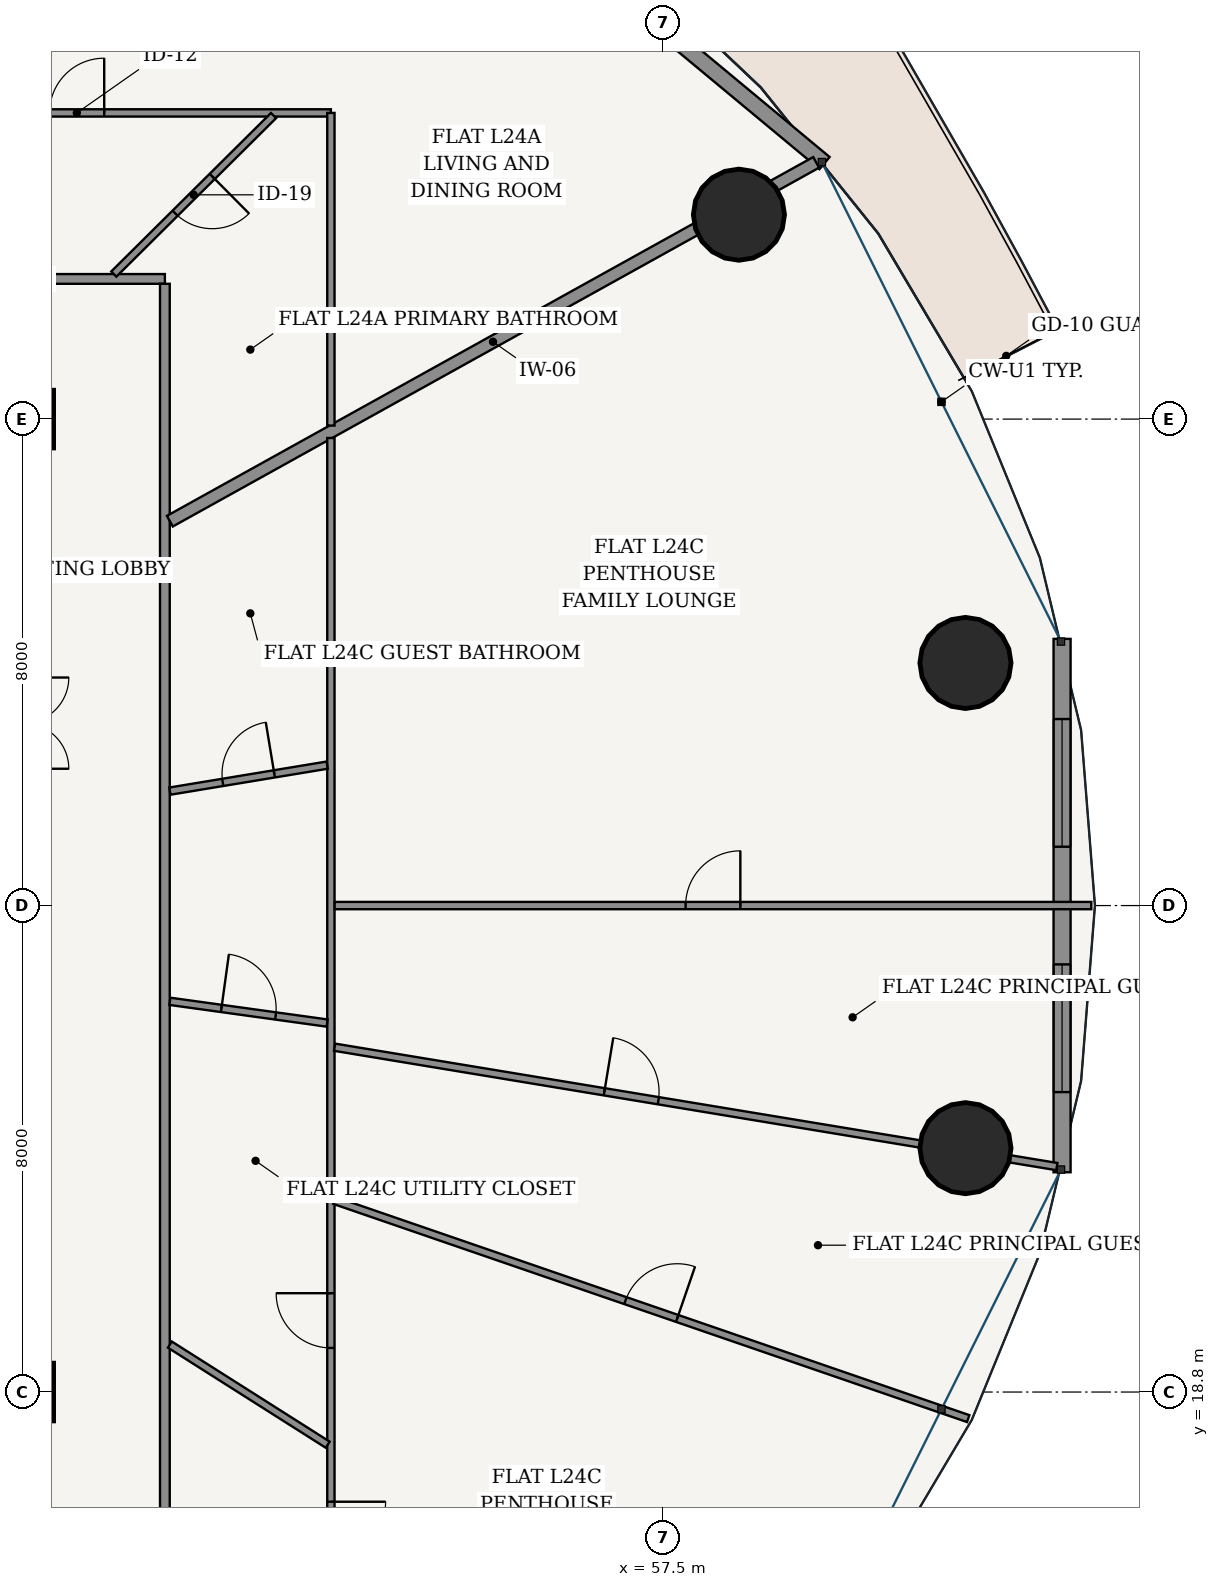
"""IFC4 building model, lengths in metres.
Left out: names, types, materials, properties, quantities, classifications, styles, units other than length and angle.
Written with IfcOpenShell. Run it as: python <this file> out.ifc"""

import sys

from ifc_helpers import new_model, si_unit, direction, frame, frame_2d, origin, origin_2d, place, context, subcontext, project, spatial, rectangle, hollow_circle, extrude, source, transform, mapped, element, fill, save


model = new_model("IFC4")
c1 = context("Model", 3, precision=1e-05, world=origin(), true_north=direction((-0.2419218956, 0.970295726276)))
c2 = subcontext(c1, "Body", "Model", "MODEL_VIEW")
j1 = project(units=[si_unit("LENGTHUNIT", "METRE"), si_unit("PLANEANGLEUNIT", "RADIAN")], contexts=[c1])
p1 = place(None, origin())
s1 = spatial("IfcSite", under=j1, at=p1, CompositionType="ELEMENT")
p2 = place(p1, origin())
s2 = spatial("IfcBuilding", under=s1, at=p2, CompositionType="ELEMENT")
p3 = place(p2, frame((0.0, 0.0, 94.2)))
s3 = spatial("IfcBuildingStorey", under=s2, at=p3, CompositionType="ELEMENT", Elevation=94.2)
for number, where, z_axis, x_axis in (
    (1, (47.0, 18.8, 0.0), (0.0, 0.0, 1.0), (1.0, 0.0, 0.0)),
    (2, (47.0, 34.8, 0.0), (0.0, 0.0, 1.0), (1.0, 0.0, 0.0)),
):
    element("IfcColumn", number, at=place(p3, frame(where, z_axis=z_axis, x_axis=x_axis)), inside=s3, PredefinedType="COLUMN", context=c2, shape_type="SweptSolid", body=[
        extrude(rectangle(XDim=0.95, YDim=0.95, at=origin_2d()), origin(), (0.0, 0.0, 1.0), 3.6),
    ])
for number, where, z_axis, x_axis in (
    (3, (62.471, 30.79, 0.0), (0.0, 0.0, 1.0), (1.0, 0.0, 0.0)),
    (4, (58.745, 38.161, 0.0), (0.0, 0.0, 1.0), (1.0, 0.0, 0.0)),
    (5, (62.471, 22.81, 0.0), (0.0, 0.0, 1.0), (1.0, 0.0, 0.0)),
):
    element("IfcColumn", number, at=place(p3, frame(where, z_axis=z_axis, x_axis=x_axis)), inside=s3, PredefinedType="COLUMN", context=c2, shape_type="SweptSolid", body=[
        extrude(hollow_circle(Radius=0.75, WallThickness=0.045, at=origin_2d()), origin(), (0.0, 0.0, 1.0), 3.6),
    ])
p4 = place(p3, frame((60.154, 39.01, 0.0), z_axis=(0.0, 0.0, 1.0), x_axis=(-0.769242574941, 0.638956853706, 0.0)))
e6 = element("IfcWall", 6, at=p4, inside=s3, PredefinedType="SOLIDWALL", context=c2, shape_type="SweptSolid", body=[
    extrude(rectangle(XDim=9.69, YDim=0.26, at=frame_2d((4.845, 0.0))), origin(), (0.0, 0.0, 1.0), 3.325),
])
p5 = place(p4, frame((4.17, 0.0, 0.0)))
e7 = element("IfcOpeningElement", 7, at=p5, cuts=e6, PredefinedType="OPENING", context=c2, shape_type="SweptSolid", body=[
    extrude(rectangle(XDim=1.35, YDim=2.2, at=frame_2d((0.675, 1.1))), frame((0.0, 0.14, 0.0), z_axis=(0.0, -1.0, 0.0), x_axis=(1.0, 0.0, 0.0)), (0.0, 0.0, 1.0), 0.28),
])
p6 = place(p3, frame((64.06, 22.414, 0.0), z_axis=(0.0, 0.0, 1.0), x_axis=(0.0, 1.0, 0.0)))
e8 = element("IfcWall", 8, at=p6, inside=s3, PredefinedType="SOLIDWALL", context=c2, shape_type="SweptSolid", body=[
    extrude(rectangle(XDim=8.771, YDim=0.28, at=frame_2d((4.386, 0.0))), origin(), (0.0, 0.0, 1.0), 3.325),
])
p7 = place(p6, frame((1.318, 0.0, 0.85)))
e9 = element("IfcOpeningElement", 9, at=p7, cuts=e8, PredefinedType="OPENING", context=c2, shape_type="SweptSolid", body=[
    extrude(rectangle(XDim=2.1, YDim=1.95, at=frame_2d((1.05, 0.975))), frame((0.0, 0.15, 0.0), z_axis=(0.0, -1.0, 0.0), x_axis=(1.0, 0.0, 0.0)), (0.0, 0.0, 1.0), 0.3),
])
p8 = place(p6, frame((5.353, 0.0, 0.85)))
e10 = element("IfcOpeningElement", 10, at=p8, cuts=e8, PredefinedType="OPENING", context=c2, shape_type="SweptSolid", body=[
    extrude(rectangle(XDim=2.1, YDim=1.95, at=frame_2d((1.05, 0.975))), frame((0.0, 0.15, 0.0), z_axis=(0.0, -1.0, 0.0), x_axis=(1.0, 0.0, 0.0)), (0.0, 0.0, 1.0), 0.3),
])
p9 = place(p3, frame((26.695, 37.105, 0.0), z_axis=(0.0, 0.0, 1.0), x_axis=(1.0, 0.0, 0.0)))
e11 = element("IfcWall", 11, at=p9, inside=s3, PredefinedType="PARTITIONING", context=c2, shape_type="SweptSolid", body=[
    extrude(rectangle(XDim=22.61, YDim=0.16, at=frame_2d((11.305, 0.0))), origin(), (0.0, 0.0, 1.0), 2.767),
])
p10 = place(p9, frame((18.058, 0.0, 0.0)))
e12 = element("IfcOpeningElement", 12, at=p10, cuts=e11, PredefinedType="OPENING", context=c2, shape_type="SweptSolid", body=[
    extrude(rectangle(XDim=0.98, YDim=2.2, at=frame_2d((0.49, 1.1))), frame((0.0, 0.09, 0.0), z_axis=(0.0, -1.0, 0.0), x_axis=(1.0, 0.0, 0.0)), (0.0, 0.0, 1.0), 0.18),
])
p11 = place(p3, frame((49.305, 16.575, 0.0), z_axis=(0.0, 0.0, 1.0), x_axis=(0.0, 1.0, 0.0)))
e13 = element("IfcWall", 13, at=p11, inside=s3, PredefinedType="PARTITIONING", context=c2, shape_type="SweptSolid", body=[
    extrude(rectangle(XDim=20.45, YDim=0.16, at=frame_2d((10.225, 0.0))), origin(), (0.0, 0.0, 1.0), 2.767),
])
p12 = place(p3, frame((49.387, 33.121, 0.0), z_axis=(0.0, 0.0, 1.0), x_axis=(0.874320165728, 0.485349613992, 0.0)))
e14 = element("IfcWall", 14, at=p12, inside=s3, PredefinedType="PARTITIONING", context=c2, shape_type="SweptSolid", body=[
    extrude(rectangle(XDim=12.156, YDim=0.2, at=frame_2d((6.078, 0.0))), origin(), (0.0, 0.0, 1.0), 2.767),
])
p13 = place(p3, frame((23.965, 39.835, 0.0), z_axis=(0.0, 0.0, 1.0), x_axis=(1.0, 0.0, 0.0)))
e15 = element("IfcWall", 15, at=p13, inside=s3, PredefinedType="PARTITIONING", context=c2, shape_type="SweptSolid", body=[
    extrude(rectangle(XDim=28.07, YDim=0.12, at=frame_2d((14.035, 0.0))), origin(), (0.0, 0.0, 1.0), 2.767),
])
p14 = place(p13, frame((23.442, 0.0, 0.0)))
e16 = element("IfcOpeningElement", 16, at=p14, cuts=e15, PredefinedType="OPENING", context=c2, shape_type="SweptSolid", body=[
    extrude(rectangle(XDim=0.9, YDim=2.15, at=frame_2d((0.45, 1.075))), frame((0.0, 0.07, 0.0), z_axis=(0.0, -1.0, 0.0), x_axis=(1.0, 0.0, 0.0)), (0.0, 0.0, 1.0), 0.14),
])
p15 = place(p3, frame((52.035, 39.835, 0.0), z_axis=(0.0, 0.0, 1.0), x_axis=(0.0, -1.0, 0.0)))
e17 = element("IfcWall", 17, at=p15, inside=s3, PredefinedType="PARTITIONING", context=c2, shape_type="SweptSolid", body=[
    extrude(rectangle(XDim=5.142, YDim=0.12, at=frame_2d((2.571, 0.0))), origin(), (0.0, 0.0, 1.0), 3.004),
])
p16 = place(p3, frame((44.526, 39.89, 0.0), z_axis=(0.0, 0.0, 1.0), x_axis=(0.446167584581, 0.894949432353, 0.0)))
e18 = element("IfcWall", 18, at=p16, inside=s3, PredefinedType="PARTITIONING", context=c2, shape_type="SweptSolid", body=[
    extrude(rectangle(XDim=8.125, YDim=0.12, at=frame_2d((4.062, 0.0))), origin(), (0.0, 0.0, 1.0), 2.767),
])
p17 = place(p16, frame((3.612, 0.0, 0.0)))
e19 = element("IfcOpeningElement", 19, at=p17, cuts=e18, PredefinedType="OPENING", context=c2, shape_type="SweptSolid", body=[
    extrude(rectangle(XDim=0.9, YDim=2.15, at=frame_2d((0.45, 1.075))), frame((0.0, 0.07, 0.0), z_axis=(0.0, -1.0, 0.0), x_axis=(1.0, 0.0, 0.0)), (0.0, 0.0, 1.0), 0.14),
])
p18 = place(p3, frame((48.465, 37.185, 0.0), z_axis=(0.0, 0.0, 1.0), x_axis=(0.709839752998, 0.704363205359, 0.0)))
e20 = element("IfcWall", 20, at=p18, inside=s3, PredefinedType="PARTITIONING", context=c2, shape_type="SweptSolid", body=[
    extrude(rectangle(XDim=3.7, YDim=0.12, at=frame_2d((1.85, 0.0))), origin(), (0.0, 0.0, 1.0), 2.767),
])
p19 = place(p18, frame((1.42, 0.0, 0.0)))
e21 = element("IfcOpeningElement", 21, at=p19, cuts=e20, PredefinedType="OPENING", context=c2, shape_type="SweptSolid", body=[
    extrude(rectangle(XDim=0.86, YDim=2.15, at=frame_2d((0.43, 1.075))), frame((0.0, 0.07, 0.0), z_axis=(0.0, -1.0, 0.0), x_axis=(1.0, 0.0, 0.0)), (0.0, 0.0, 1.0), 0.14),
])
p20 = place(p3, frame((52.035, 34.49, 0.0), z_axis=(0.0, 0.0, 1.0), x_axis=(0.0, -1.0, 0.0)))
e22 = element("IfcWall", 22, at=p20, inside=s3, PredefinedType="PARTITIONING", context=c2, shape_type="SweptSolid", body=[
    extrude(rectangle(XDim=20.725, YDim=0.12, at=frame_2d((10.362, 0.0))), origin(), (0.0, 0.0, 1.0), 2.767),
])
p21 = place(p20, frame((17.493, 0.0, 0.0)))
e23 = element("IfcOpeningElement", 23, at=p21, cuts=e22, PredefinedType="OPENING", context=c2, shape_type="SweptSolid", body=[
    extrude(rectangle(XDim=0.9, YDim=2.15, at=frame_2d((0.45, 1.075))), frame((0.0, 0.07, 0.0), z_axis=(0.0, -1.0, 0.0), x_axis=(1.0, 0.0, 0.0)), (0.0, 0.0, 1.0), 0.14),
])
p22 = place(p20, frame((14.064, 0.0, 0.0)))
e24 = element("IfcOpeningElement", 24, at=p22, cuts=e22, PredefinedType="OPENING", context=c2, shape_type="SweptSolid", body=[
    extrude(rectangle(XDim=0.9, YDim=2.15, at=frame_2d((0.45, 1.075))), frame((0.0, 0.07, 0.0), z_axis=(0.0, -1.0, 0.0), x_axis=(1.0, 0.0, 0.0)), (0.0, 0.0, 1.0), 0.14),
])
p23 = place(p3, frame((52.094, 21.95, 0.0), z_axis=(0.0, 0.0, 1.0), x_axis=(0.945573120726, -0.32540970078, 0.0)))
e25 = element("IfcWall", 25, at=p23, inside=s3, PredefinedType="PARTITIONING", context=c2, shape_type="SweptSolid", body=[
    extrude(rectangle(XDim=11.022, YDim=0.12, at=frame_2d((5.511, 0.0))), origin(), (0.0, 0.0, 1.0), 2.767),
])
p24 = place(p23, frame((5.061, 0.0, 0.0)))
e26 = element("IfcOpeningElement", 26, at=p24, cuts=e25, PredefinedType="OPENING", context=c2, shape_type="SweptSolid", body=[
    extrude(rectangle(XDim=0.9, YDim=2.15, at=frame_2d((0.45, 1.075))), frame((0.0, 0.07, 0.0), z_axis=(0.0, -1.0, 0.0), x_axis=(1.0, 0.0, 0.0)), (0.0, 0.0, 1.0), 0.14),
])
p25 = place(p3, frame((52.096, 24.47, 0.0), z_axis=(0.0, 0.0, 1.0), x_axis=(0.986618264768, -0.163047231274, 0.0)))
e27 = element("IfcWall", 27, at=p25, inside=s3, PredefinedType="PARTITIONING", context=c2, shape_type="SweptSolid", body=[
    extrude(rectangle(XDim=12.039, YDim=0.12, at=frame_2d((6.02, 0.0))), origin(), (0.0, 0.0, 1.0), 2.767),
])
p26 = place(p25, frame((4.496, 0.0, 0.0)))
e28 = element("IfcOpeningElement", 28, at=p26, cuts=e27, PredefinedType="OPENING", context=c2, shape_type="SweptSolid", body=[
    extrude(rectangle(XDim=0.9, YDim=2.15, at=frame_2d((0.45, 1.075))), frame((0.0, 0.07, 0.0), z_axis=(0.0, -1.0, 0.0), x_axis=(1.0, 0.0, 0.0)), (0.0, 0.0, 1.0), 0.14),
])
p27 = place(p3, frame((52.097, 26.8, 0.0), z_axis=(0.0, 0.0, 1.0), x_axis=(1.0, 0.0, 0.0)))
e29 = element("IfcWall", 29, at=p27, inside=s3, PredefinedType="PARTITIONING", context=c2, shape_type="SweptSolid", body=[
    extrude(rectangle(XDim=12.443, YDim=0.12, at=frame_2d((6.222, 0.0))), origin(), (0.0, 0.0, 1.0), 2.767),
])
p28 = place(p27, frame((5.771, 0.0, 0.0)))
e30 = element("IfcOpeningElement", 30, at=p28, cuts=e29, PredefinedType="OPENING", context=c2, shape_type="SweptSolid", body=[
    extrude(rectangle(XDim=0.9, YDim=2.15, at=frame_2d((0.45, 1.075))), frame((0.0, 0.07, 0.0), z_axis=(0.0, -1.0, 0.0), x_axis=(1.0, 0.0, 0.0)), (0.0, 0.0, 1.0), 0.14),
])
p29 = place(p3, frame((49.387, 19.58, 0.0), z_axis=(0.0, 0.0, 1.0), x_axis=(0.844540118368, -0.535492286094, 0.0)))
e31 = element("IfcWall", 31, at=p29, inside=s3, PredefinedType="PARTITIONING", context=c2, shape_type="SweptSolid", body=[
    extrude(rectangle(XDim=3.074, YDim=0.12, at=frame_2d((1.537, 0.0))), origin(), (0.0, 0.0, 1.0), 3.325),
])
p30 = place(p3, frame((49.387, 25.225, 0.0), z_axis=(0.0, 0.0, 1.0), x_axis=(0.990575253555, -0.136969584375, 0.0)))
e32 = element("IfcWall", 32, at=p30, inside=s3, PredefinedType="PARTITIONING", context=c2, shape_type="SweptSolid", body=[
    extrude(rectangle(XDim=2.611, YDim=0.12, at=frame_2d((1.306, 0.0))), origin(), (0.0, 0.0, 1.0), 3.325),
])
p31 = place(p30, frame((0.856, 0.0, 0.0)))
e33 = element("IfcOpeningElement", 33, at=p31, cuts=e32, PredefinedType="OPENING", context=c2, shape_type="SweptSolid", body=[
    extrude(rectangle(XDim=0.9, YDim=2.15, at=frame_2d((0.45, 1.075))), frame((0.0, 0.07, 0.0), z_axis=(0.0, -1.0, 0.0), x_axis=(1.0, 0.0, 0.0)), (0.0, 0.0, 1.0), 0.14),
])
p32 = place(p3, frame((49.387, 28.682, 0.0), z_axis=(0.0, 0.0, 1.0), x_axis=(0.986619477472, 0.163039892889, 0.0)))
e34 = element("IfcWall", 34, at=p32, inside=s3, PredefinedType="PARTITIONING", context=c2, shape_type="SweptSolid", body=[
    extrude(rectangle(XDim=2.622, YDim=0.12, at=frame_2d((1.311, 0.0))), origin(), (0.0, 0.0, 1.0), 2.767),
])
p33 = place(p32, frame((0.881, 0.0, 0.0)))
e35 = element("IfcOpeningElement", 35, at=p33, cuts=e34, PredefinedType="OPENING", context=c2, shape_type="SweptSolid", body=[
    extrude(rectangle(XDim=0.86, YDim=2.15, at=frame_2d((0.43, 1.075))), frame((0.0, 0.07, 0.0), z_axis=(0.0, -1.0, 0.0), x_axis=(1.0, 0.0, 0.0)), (0.0, 0.0, 1.0), 0.14),
])
m1 = source(origin(), c2, "Body", "SweptSolid", [
    extrude(rectangle(XDim=2.1, YDim=1.95, at=frame_2d((1.05, 0.975))), frame((0.0, 0.03, 0.0), z_axis=(0.0, -1.0, 0.0), x_axis=(1.0, 0.0, 0.0)), (0.0, 0.0, 1.0), 0.06),
])
p34 = place(p7, origin())
e36 = element("IfcWindow", 36, at=p34, inside=s3, PartitioningType="SINGLE_PANEL", PredefinedType="WINDOW", context=c2, shape_type="MappedRepresentation", body=[
    mapped(m1, transform((0.0, 0.0, 0.0), scale=1.0)),
])
fill(e9, e36)
p35 = place(p8, origin())
e37 = element("IfcWindow", 37, at=p35, inside=s3, PartitioningType="SINGLE_PANEL", PredefinedType="WINDOW", context=c2, shape_type="MappedRepresentation", body=[
    mapped(m1, transform((0.0, 0.0, 0.0), scale=1.0)),
])
fill(e10, e37)
m2 = source(origin(), c2, "Body", "SweptSolid", [
    extrude(rectangle(XDim=0.86, YDim=2.15, at=frame_2d((0.43, 1.075))), frame((0.0, 0.025, 0.0), z_axis=(0.0, -1.0, 0.0), x_axis=(1.0, 0.0, 0.0)), (0.0, 0.0, 1.0), 0.05),
])
p36 = place(p19, frame((0.86, 0.0, 0.0), z_axis=(0.0, 0.0, 1.0), x_axis=(-1.0, 0.0, 0.0)))
e38 = element("IfcDoor", 38, at=p36, inside=s3, OperationType="SINGLE_SWING_LEFT", PredefinedType="DOOR", context=c2, shape_type="MappedRepresentation", body=[
    mapped(m2, transform((0.0, 0.0, 0.0), scale=1.0)),
])
fill(e21, e38)
m3 = source(origin(), c2, "Body", "SweptSolid", [
    extrude(rectangle(XDim=0.9, YDim=2.15, at=frame_2d((0.45, 1.075))), frame((0.0, 0.025, 0.0), z_axis=(0.0, -1.0, 0.0), x_axis=(1.0, 0.0, 0.0)), (0.0, 0.0, 1.0), 0.05),
])
p37 = place(p14, origin())
e39 = element("IfcDoor", 39, at=p37, inside=s3, OperationType="SINGLE_SWING_RIGHT", PredefinedType="DOOR", context=c2, shape_type="MappedRepresentation", body=[
    mapped(m3, transform((0.0, 0.0, 0.0), scale=1.0)),
])
fill(e16, e39)
p38 = place(p21, origin())
e40 = element("IfcDoor", 40, at=p38, inside=s3, OperationType="SINGLE_SWING_LEFT", PredefinedType="DOOR", context=c2, shape_type="MappedRepresentation", body=[
    mapped(m3, transform((0.0, 0.0, 0.0), scale=1.0)),
])
fill(e23, e40)
p39 = place(p22, frame((0.9, 0.0, 0.0), z_axis=(0.0, 0.0, 1.0), x_axis=(-1.0, 0.0, 0.0)))
e41 = element("IfcDoor", 41, at=p39, inside=s3, OperationType="SINGLE_SWING_RIGHT", PredefinedType="DOOR", context=c2, shape_type="MappedRepresentation", body=[
    mapped(m3, transform((0.0, 0.0, 0.0), scale=1.0)),
])
fill(e24, e41)
p40 = place(p31, origin())
e42 = element("IfcDoor", 42, at=p40, inside=s3, OperationType="SINGLE_SWING_LEFT", PredefinedType="DOOR", context=c2, shape_type="MappedRepresentation", body=[
    mapped(m3, transform((0.0, 0.0, 0.0), scale=1.0)),
])
fill(e33, e42)
p41 = place(p33, origin())
e43 = element("IfcDoor", 43, at=p41, inside=s3, OperationType="SINGLE_SWING_RIGHT", PredefinedType="DOOR", context=c2, shape_type="MappedRepresentation", body=[
    mapped(m2, transform((0.0, 0.0, 0.0), scale=1.0)),
])
fill(e35, e43)
p42 = place(p24, origin())
e44 = element("IfcDoor", 44, at=p42, inside=s3, OperationType="SINGLE_SWING_RIGHT", PredefinedType="DOOR", context=c2, shape_type="MappedRepresentation", body=[
    mapped(m3, transform((0.0, 0.0, 0.0), scale=1.0)),
])
fill(e26, e44)
p43 = place(p26, origin())
e45 = element("IfcDoor", 45, at=p43, inside=s3, OperationType="SINGLE_SWING_LEFT", PredefinedType="DOOR", context=c2, shape_type="MappedRepresentation", body=[
    mapped(m3, transform((0.0, 0.0, 0.0), scale=1.0)),
])
fill(e28, e45)
p44 = place(p28, origin())
e46 = element("IfcDoor", 46, at=p44, inside=s3, OperationType="SINGLE_SWING_RIGHT", PredefinedType="DOOR", context=c2, shape_type="MappedRepresentation", body=[
    mapped(m3, transform((0.0, 0.0, 0.0), scale=1.0)),
])
fill(e30, e46)
save(model, sys.argv[1])
